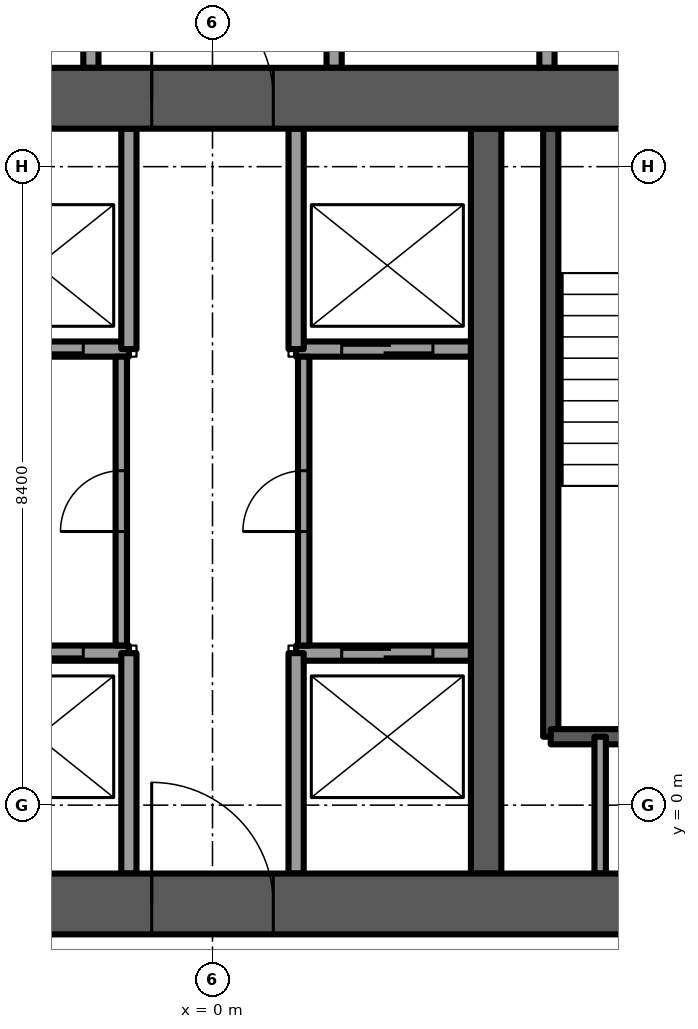
"""IFC4 building model, lengths in metres.
Left out: names, types, materials, properties, quantities, classifications, styles, units other than length and angle.
Written with IfcOpenShell. Run it as: python <this file> out.ifc"""

import sys

from ifc_helpers import new_model, si_unit, direction, frame, frame_2d, origin, place, context, subcontext, project, spatial, rectangle, extrude, element, fill, save


model = new_model("IFC4")
c1 = context("Model", 3, precision=1e-05, world=origin(), true_north=direction((0.0, 1.0)))
c2 = subcontext(c1, "Body", "Model", "MODEL_VIEW")
j1 = project(units=[si_unit("LENGTHUNIT", "METRE"), si_unit("PLANEANGLEUNIT", "RADIAN")], contexts=[c1])
p1 = place(None, origin())
s1 = spatial("IfcSite", under=j1, at=p1, CompositionType="ELEMENT")
p2 = place(p1, origin())
s2 = spatial("IfcBuilding", under=s1, at=p2, CompositionType="ELEMENT")
p3 = place(p2, frame((0.0, 0.0, 157.0)))
s3 = spatial("IfcBuildingStorey", under=s2, at=p3, CompositionType="ELEMENT", Elevation=157.0)
p4 = place(p3, frame((-8.5, -1.3, -0.3), z_axis=(0.0, 0.0, 1.0), x_axis=(1.0, 0.0, 0.0)))
e1 = element("IfcWall", 1, at=p4, inside=s3, PredefinedType="SHEAR", context=c2, shape_type="SweptSolid", body=[
    extrude(rectangle(XDim=17.0, YDim=0.8, at=frame_2d((8.5, 0.0))), origin(), (0.0, 0.0, 1.0), 3.75),
])
p5 = place(p4, frame((7.7, 0.0, 0.0)))
e2 = element("IfcOpeningElement", 2, at=p5, cuts=e1, PredefinedType="OPENING", context=c2, shape_type="SweptSolid", body=[
    extrude(rectangle(XDim=1.6, YDim=2.1, at=frame_2d((0.8, 1.05))), frame((0.0, 0.4, 0.0), z_axis=(0.0, -1.0, 0.0), x_axis=(1.0, 0.0, 0.0)), (0.0, 0.0, 1.0), 0.8),
])
p6 = place(p3, frame((-8.5, 9.3, -0.3), z_axis=(0.0, 0.0, 1.0), x_axis=(1.0, 0.0, 0.0)))
e3 = element("IfcWall", 3, at=p6, inside=s3, PredefinedType="SHEAR", context=c2, shape_type="SweptSolid", body=[
    extrude(rectangle(XDim=17.0, YDim=0.8, at=frame_2d((8.5, 0.0))), origin(), (0.0, 0.0, 1.0), 3.75),
])
p7 = place(p6, frame((7.7, 0.0, 0.0)))
e4 = element("IfcOpeningElement", 4, at=p7, cuts=e3, PredefinedType="OPENING", context=c2, shape_type="SweptSolid", body=[
    extrude(rectangle(XDim=1.6, YDim=2.1, at=frame_2d((0.8, 1.05))), frame((0.0, 0.4, 0.0), z_axis=(0.0, -1.0, 0.0), x_axis=(1.0, 0.0, 0.0)), (0.0, 0.0, 1.0), 0.8),
])
p8 = place(p6, frame((1.75, 0.0, 0.0)))
e5 = element("IfcOpeningElement", 5, at=p8, cuts=e3, PredefinedType="OPENING", context=c2, shape_type="SweptSolid", body=[
    extrude(rectangle(XDim=1.1, YDim=2.1, at=frame_2d((0.55, 1.05))), frame((0.0, 0.4, 0.0), z_axis=(0.0, -1.0, 0.0), x_axis=(1.0, 0.0, 0.0)), (0.0, 0.0, 1.0), 0.8),
])
p9 = place(p6, frame((14.15, 0.0, 0.0)))
e6 = element("IfcOpeningElement", 6, at=p9, cuts=e3, PredefinedType="OPENING", context=c2, shape_type="SweptSolid", body=[
    extrude(rectangle(XDim=1.1, YDim=2.1, at=frame_2d((0.55, 1.05))), frame((0.0, 0.4, 0.0), z_axis=(0.0, -1.0, 0.0), x_axis=(1.0, 0.0, 0.0)), (0.0, 0.0, 1.0), 0.8),
])
p10 = place(p3, frame((3.6, -0.9, -0.3), z_axis=(0.0, 0.0, 1.0), x_axis=(0.0, 1.0, 0.0)))
e7 = element("IfcWall", 7, at=p10, inside=s3, PredefinedType="SHEAR", context=c2, shape_type="SweptSolid", body=[
    extrude(rectangle(XDim=9.8, YDim=0.4, at=frame_2d((4.9, 0.0))), origin(), (0.0, 0.0, 1.0), 3.75),
])
p11 = place(p3, frame((-3.4, 2.0, 0.0), z_axis=(0.0, 0.0, 1.0), x_axis=(1.0, 0.0, 0.0)))
e8 = element("IfcWall", 8, at=p11, inside=s3, PredefinedType="PARTITIONING", context=c2, shape_type="SweptSolid", body=[
    extrude(rectangle(XDim=2.3, YDim=0.2, at=frame_2d((1.15, 0.0))), origin(), (0.0, 0.0, 1.0), 3.45),
])
p12 = place(p11, frame((0.5, 0.0, 0.0)))
e9 = element("IfcOpeningElement", 9, at=p12, cuts=e8, PredefinedType="OPENING", context=c2, shape_type="SweptSolid", body=[
    extrude(rectangle(XDim=1.2, YDim=2.1, at=frame_2d((0.6, 1.05))), frame((0.0, 0.1, 0.0), z_axis=(0.0, -1.0, 0.0), x_axis=(1.0, 0.0, 0.0)), (0.0, 0.0, 1.0), 0.2),
])
p13 = place(p3, frame((-3.4, 6.0, 0.0), z_axis=(0.0, 0.0, 1.0), x_axis=(1.0, 0.0, 0.0)))
e10 = element("IfcWall", 10, at=p13, inside=s3, PredefinedType="PARTITIONING", context=c2, shape_type="SweptSolid", body=[
    extrude(rectangle(XDim=2.3, YDim=0.2, at=frame_2d((1.15, 0.0))), origin(), (0.0, 0.0, 1.0), 3.45),
])
p14 = place(p13, frame((0.5, 0.0, 0.0)))
e11 = element("IfcOpeningElement", 11, at=p14, cuts=e10, PredefinedType="OPENING", context=c2, shape_type="SweptSolid", body=[
    extrude(rectangle(XDim=1.2, YDim=2.1, at=frame_2d((0.6, 1.05))), frame((0.0, 0.1, 0.0), z_axis=(0.0, -1.0, 0.0), x_axis=(1.0, 0.0, 0.0)), (0.0, 0.0, 1.0), 0.2),
])
p15 = place(p3, frame((1.1, 2.0, 0.0), z_axis=(0.0, 0.0, 1.0), x_axis=(1.0, 0.0, 0.0)))
e12 = element("IfcWall", 12, at=p15, inside=s3, PredefinedType="PARTITIONING", context=c2, shape_type="SweptSolid", body=[
    extrude(rectangle(XDim=2.3, YDim=0.2, at=frame_2d((1.15, 0.0))), origin(), (0.0, 0.0, 1.0), 3.45),
])
p16 = place(p15, frame((0.6, 0.0, 0.0)))
e13 = element("IfcOpeningElement", 13, at=p16, cuts=e12, PredefinedType="OPENING", context=c2, shape_type="SweptSolid", body=[
    extrude(rectangle(XDim=1.2, YDim=2.1, at=frame_2d((0.6, 1.05))), frame((0.0, 0.1, 0.0), z_axis=(0.0, -1.0, 0.0), x_axis=(1.0, 0.0, 0.0)), (0.0, 0.0, 1.0), 0.2),
])
p17 = place(p3, frame((1.1, 6.0, 0.0), z_axis=(0.0, 0.0, 1.0), x_axis=(1.0, 0.0, 0.0)))
e14 = element("IfcWall", 14, at=p17, inside=s3, PredefinedType="PARTITIONING", context=c2, shape_type="SweptSolid", body=[
    extrude(rectangle(XDim=2.3, YDim=0.2, at=frame_2d((1.15, 0.0))), origin(), (0.0, 0.0, 1.0), 3.45),
])
p18 = place(p17, frame((0.6, 0.0, 0.0)))
e15 = element("IfcOpeningElement", 15, at=p18, cuts=e14, PredefinedType="OPENING", context=c2, shape_type="SweptSolid", body=[
    extrude(rectangle(XDim=1.2, YDim=2.1, at=frame_2d((0.6, 1.05))), frame((0.0, 0.1, 0.0), z_axis=(0.0, -1.0, 0.0), x_axis=(1.0, 0.0, 0.0)), (0.0, 0.0, 1.0), 0.2),
])
for number, where, z_axis, x_axis in (
    (16, (-1.1, -0.9, 0.0), (0.0, 0.0, 1.0), (0.0, 1.0, 0.0)),
    (17, (1.1, -0.9, 0.0), (0.0, 0.0, 1.0), (0.0, 1.0, 0.0)),
    (18, (-1.1, 6.0, 0.0), (0.0, 0.0, 1.0), (0.0, 1.0, 0.0)),
    (19, (1.1, 6.0, 0.0), (0.0, 0.0, 1.0), (0.0, 1.0, 0.0)),
):
    element("IfcWall", number, at=place(p3, frame(where, z_axis=z_axis, x_axis=x_axis)), inside=s3, PredefinedType="PARTITIONING", context=c2, shape_type="SweptSolid", body=[
        extrude(rectangle(XDim=2.9, YDim=0.2, at=frame_2d((1.45, 0.0))), origin(), (0.0, 0.0, 1.0), 3.45),
    ])
p19 = place(p3, frame((4.45, 0.9, -0.3), z_axis=(0.0, 0.0, 1.0), x_axis=(0.0, 1.0, 0.0)))
e20 = element("IfcWall", 20, at=p19, inside=s3, PredefinedType="SOLIDWALL", context=c2, shape_type="SweptSolid", body=[
    extrude(rectangle(XDim=8.0, YDim=0.2, at=frame_2d((4.0, 0.0))), origin(), (0.0, 0.0, 1.0), 3.75),
])
p20 = place(p3, frame((4.45, 0.9, -0.3), z_axis=(0.0, 0.0, 1.0), x_axis=(1.0, 0.0, 0.0)))
e21 = element("IfcWall", 21, at=p20, inside=s3, PredefinedType="SOLIDWALL", context=c2, shape_type="SweptSolid", body=[
    extrude(rectangle(XDim=3.25, YDim=0.2, at=frame_2d((1.625, 0.0))), origin(), (0.0, 0.0, 1.0), 3.75),
])
p21 = place(p3, frame((5.1, -0.9, 0.0), z_axis=(0.0, 0.0, 1.0), x_axis=(0.0, 1.0, 0.0)))
e22 = element("IfcWall", 22, at=p21, inside=s3, PredefinedType="PARTITIONING", context=c2, shape_type="SweptSolid", body=[
    extrude(rectangle(XDim=1.8, YDim=0.15, at=frame_2d((0.9, 0.0))), origin(), (0.0, 0.0, 1.0), 3.45),
])
p22 = place(p3, frame((4.4, 9.7, 0.0), z_axis=(0.0, 0.0, 1.0), x_axis=(0.0, 1.0, 0.0)))
e23 = element("IfcWall", 23, at=p22, inside=s3, PredefinedType="PARTITIONING", context=c2, shape_type="SweptSolid", body=[
    extrude(rectangle(XDim=3.9, YDim=0.2, at=frame_2d((1.95, 0.0))), origin(), (0.0, 0.0, 1.0), 3.45),
])
p23 = place(p22, frame((1.35, 0.0, 0.0)))
e24 = element("IfcOpeningElement", 24, at=p23, cuts=e23, PredefinedType="OPENING", context=c2, shape_type="SweptSolid", body=[
    extrude(rectangle(XDim=1.2, YDim=2.1, at=frame_2d((0.6, 1.05))), frame((0.0, 0.1, 0.0), z_axis=(0.0, -1.0, 0.0), x_axis=(1.0, 0.0, 0.0)), (0.0, 0.0, 1.0), 0.2),
])
for number, where, z_axis, x_axis in (
    (25, (-1.6, 9.7, 0.0), (0.0, 0.0, 1.0), (0.0, 1.0, 0.0)),
    (26, (1.6, 9.7, 0.0), (0.0, 0.0, 1.0), (0.0, 1.0, 0.0)),
):
    element("IfcWall", number, at=place(p3, frame(where, z_axis=z_axis, x_axis=x_axis)), inside=s3, PredefinedType="PARTITIONING", context=c2, shape_type="SweptSolid", body=[
        extrude(rectangle(XDim=3.9, YDim=0.2, at=frame_2d((1.95, 0.0))), origin(), (0.0, 0.0, 1.0), 3.45),
    ])
p24 = place(p3, frame((-1.2, 2.1, 0.0), z_axis=(0.0, 0.0, 1.0), x_axis=(0.0, 1.0, 0.0)))
e27 = element("IfcWall", 27, at=p24, inside=s3, PredefinedType="PARTITIONING", context=c2, shape_type="SweptSolid", body=[
    extrude(rectangle(XDim=3.8, YDim=0.15, at=frame_2d((1.9, 0.0))), origin(), (0.0, 0.0, 1.0), 3.45),
])
p25 = place(p24, frame((1.5, 0.0, 0.0)))
e28 = element("IfcOpeningElement", 28, at=p25, cuts=e27, PredefinedType="OPENING", context=c2, shape_type="SweptSolid", body=[
    extrude(rectangle(XDim=0.8, YDim=2.1, at=frame_2d((0.4, 1.05))), frame((0.0, 0.075, 0.0), z_axis=(0.0, -1.0, 0.0), x_axis=(1.0, 0.0, 0.0)), (0.0, 0.0, 1.0), 0.15),
])
p26 = place(p3, frame((1.2, 2.1, 0.0), z_axis=(0.0, 0.0, 1.0), x_axis=(0.0, 1.0, 0.0)))
e29 = element("IfcWall", 29, at=p26, inside=s3, PredefinedType="PARTITIONING", context=c2, shape_type="SweptSolid", body=[
    extrude(rectangle(XDim=3.8, YDim=0.15, at=frame_2d((1.9, 0.0))), origin(), (0.0, 0.0, 1.0), 3.45),
])
p27 = place(p26, frame((1.5, 0.0, 0.0)))
e30 = element("IfcOpeningElement", 30, at=p27, cuts=e29, PredefinedType="OPENING", context=c2, shape_type="SweptSolid", body=[
    extrude(rectangle(XDim=0.8, YDim=2.1, at=frame_2d((0.4, 1.05))), frame((0.0, 0.075, 0.0), z_axis=(0.0, -1.0, 0.0), x_axis=(1.0, 0.0, 0.0)), (0.0, 0.0, 1.0), 0.15),
])
p28 = place(p12, origin())
e31 = element("IfcDoor", 31, at=p28, inside=s3, OperationType="SLIDING_TO_LEFT", PredefinedType="DOOR", context=c2, shape_type="SweptSolid", body=[
    extrude(rectangle(XDim=1.2, YDim=2.1, at=frame_2d((0.6, 1.05))), frame((0.0, 0.025, 0.0), z_axis=(0.0, -1.0, 0.0), x_axis=(1.0, 0.0, 0.0)), (0.0, 0.0, 1.0), 0.05),
])
fill(e9, e31)
p29 = place(p16, origin())
e32 = element("IfcDoor", 32, at=p29, inside=s3, OperationType="SLIDING_TO_LEFT", PredefinedType="DOOR", context=c2, shape_type="SweptSolid", body=[
    extrude(rectangle(XDim=1.2, YDim=2.1, at=frame_2d((0.6, 1.05))), frame((0.0, 0.025, 0.0), z_axis=(0.0, -1.0, 0.0), x_axis=(1.0, 0.0, 0.0)), (0.0, 0.0, 1.0), 0.05),
])
fill(e13, e32)
p30 = place(p14, origin())
e33 = element("IfcDoor", 33, at=p30, inside=s3, OperationType="SLIDING_TO_LEFT", PredefinedType="DOOR", context=c2, shape_type="SweptSolid", body=[
    extrude(rectangle(XDim=1.2, YDim=2.1, at=frame_2d((0.6, 1.05))), frame((0.0, 0.025, 0.0), z_axis=(0.0, -1.0, 0.0), x_axis=(1.0, 0.0, 0.0)), (0.0, 0.0, 1.0), 0.05),
])
fill(e11, e33)
p31 = place(p18, origin())
e34 = element("IfcDoor", 34, at=p31, inside=s3, OperationType="SLIDING_TO_LEFT", PredefinedType="DOOR", context=c2, shape_type="SweptSolid", body=[
    extrude(rectangle(XDim=1.2, YDim=2.1, at=frame_2d((0.6, 1.05))), frame((0.0, 0.025, 0.0), z_axis=(0.0, -1.0, 0.0), x_axis=(1.0, 0.0, 0.0)), (0.0, 0.0, 1.0), 0.05),
])
fill(e15, e34)
p32 = place(p5, origin())
e35 = element("IfcDoor", 35, at=p32, inside=s3, OperationType="DOUBLE_DOOR_SINGLE_SWING", PredefinedType="DOOR", context=c2, shape_type="SweptSolid", body=[
    extrude(rectangle(XDim=1.6, YDim=2.1, at=frame_2d((0.8, 1.05))), frame((0.0, 0.025, 0.0), z_axis=(0.0, -1.0, 0.0), x_axis=(1.0, 0.0, 0.0)), (0.0, 0.0, 1.0), 0.05),
])
fill(e2, e35)
p33 = place(p7, origin())
e36 = element("IfcDoor", 36, at=p33, inside=s3, OperationType="DOUBLE_DOOR_SINGLE_SWING", PredefinedType="DOOR", context=c2, shape_type="SweptSolid", body=[
    extrude(rectangle(XDim=1.6, YDim=2.1, at=frame_2d((0.8, 1.05))), frame((0.0, 0.025, 0.0), z_axis=(0.0, -1.0, 0.0), x_axis=(1.0, 0.0, 0.0)), (0.0, 0.0, 1.0), 0.05),
])
fill(e4, e36)
p34 = place(p25, origin())
e37 = element("IfcDoor", 37, at=p34, inside=s3, OperationType="SINGLE_SWING_LEFT", PredefinedType="DOOR", context=c2, shape_type="SweptSolid", body=[
    extrude(rectangle(XDim=0.8, YDim=2.1, at=frame_2d((0.4, 1.05))), frame((0.0, 0.025, 0.0), z_axis=(0.0, -1.0, 0.0), x_axis=(1.0, 0.0, 0.0)), (0.0, 0.0, 1.0), 0.05),
])
fill(e28, e37)
p35 = place(p27, origin())
e38 = element("IfcDoor", 38, at=p35, inside=s3, OperationType="SINGLE_SWING_RIGHT", PredefinedType="DOOR", context=c2, shape_type="SweptSolid", body=[
    extrude(rectangle(XDim=0.8, YDim=2.1, at=frame_2d((0.4, 1.05))), frame((0.0, 0.025, 0.0), z_axis=(0.0, -1.0, 0.0), x_axis=(1.0, 0.0, 0.0)), (0.0, 0.0, 1.0), 0.05),
])
fill(e30, e38)
save(model, sys.argv[1])
